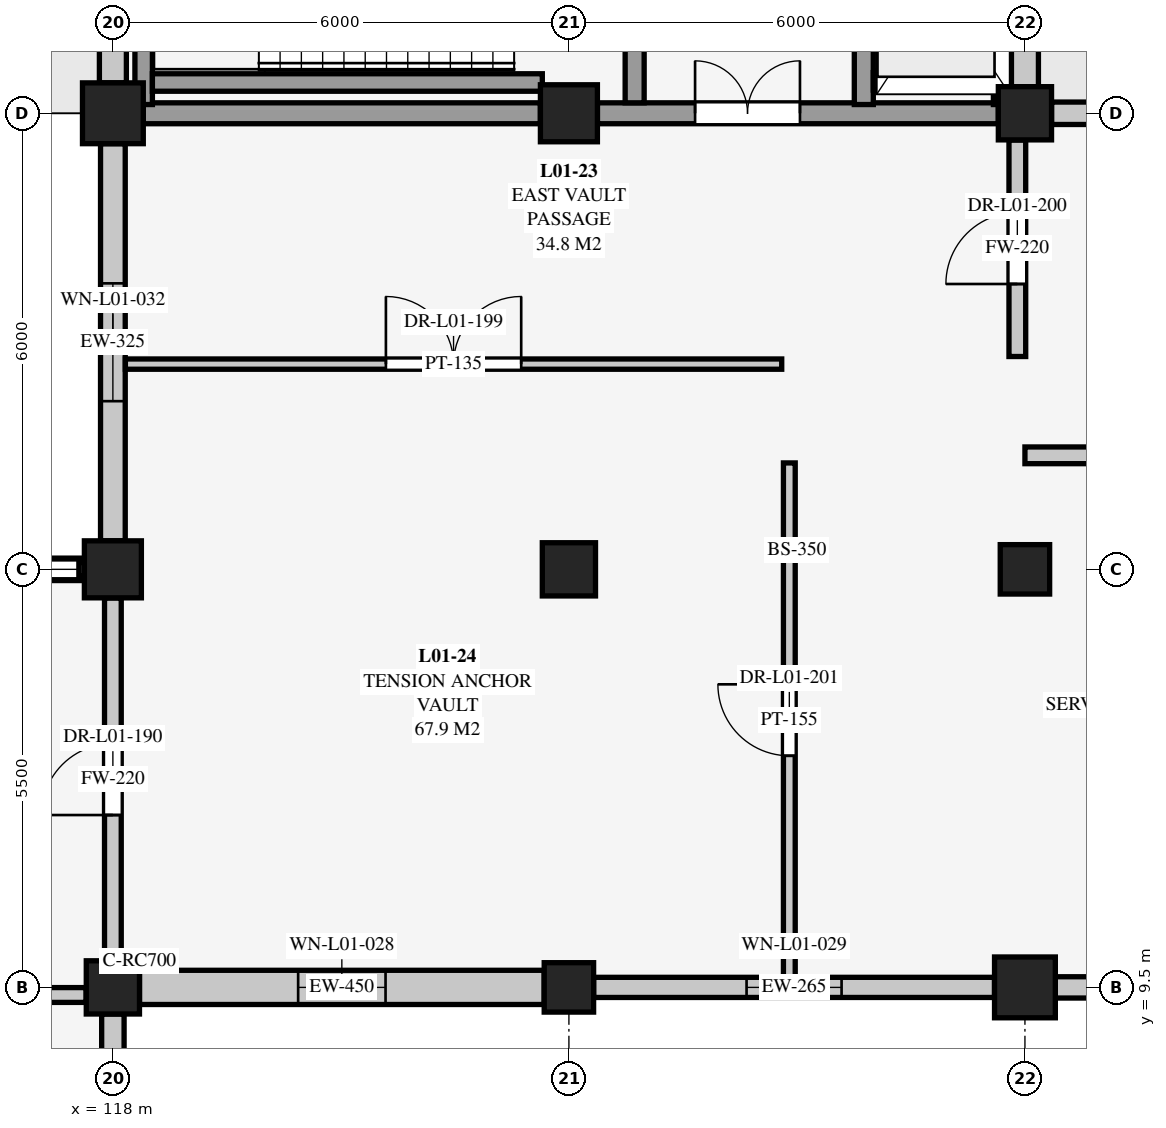
"""IFC4 building model, lengths in metres.
Left out: names, types, materials, properties, quantities, classifications, styles, units other than length and angle.
Written with IfcOpenShell. Run it as: python <this file> out.ifc"""

import sys

from ifc_helpers import new_model, si_unit, direction, frame, frame_2d, origin, origin_2d, place, context, subcontext, project, spatial, rectangle, extrude, element, fill, save


model = new_model("IFC4")
c1 = context("Model", 3, precision=1e-05, world=origin(), true_north=direction((0.0, 1.0)))
c2 = subcontext(c1, "Body", "Model", "MODEL_VIEW")
j1 = project(units=[si_unit("LENGTHUNIT", "METRE"), si_unit("PLANEANGLEUNIT", "RADIAN")], contexts=[c1])
p1 = place(None, origin())
s1 = spatial("IfcSite", under=j1, at=p1, CompositionType="ELEMENT")
p2 = place(p1, origin())
s2 = spatial("IfcBuilding", under=s1, at=p2, CompositionType="ELEMENT")
p3 = place(p2, origin())
s3 = spatial("IfcBuildingStorey", under=s2, at=p3, CompositionType="ELEMENT", Elevation=0.0)
p4 = place(p3, frame((118.0, 9.5, 0.0), z_axis=(0.0, 0.0, 1.0), x_axis=(1.0, 0.0, 0.0)))
e1 = element("IfcColumn", 1, at=p4, inside=s3, PredefinedType="COLUMN", context=c2, shape_type="SweptSolid", body=[
    extrude(rectangle(XDim=0.7, YDim=0.7, at=origin_2d()), origin(), (0.0, 0.0, 1.0), 4.5),
])
p5 = place(p3, frame((118.0, 15.0, 0.0), z_axis=(0.0, 0.0, 1.0), x_axis=(1.0, 0.0, 0.0)))
e2 = element("IfcColumn", 2, at=p5, inside=s3, PredefinedType="COLUMN", context=c2, shape_type="SweptSolid", body=[
    extrude(rectangle(XDim=0.75, YDim=0.75, at=origin_2d()), origin(), (0.0, 0.0, 1.0), 4.5),
])
p6 = place(p3, frame((118.0, 21.0, 0.0), z_axis=(0.0, 0.0, 1.0), x_axis=(1.0, 0.0, 0.0)))
e3 = element("IfcColumn", 3, at=p6, inside=s3, PredefinedType="COLUMN", context=c2, shape_type="SweptSolid", body=[
    extrude(rectangle(XDim=0.8, YDim=0.8, at=origin_2d()), origin(), (0.0, 0.0, 1.0), 4.5),
])
p7 = place(p3, frame((124.0, 9.5, 0.0), z_axis=(0.0, 0.0, 1.0), x_axis=(1.0, 0.0, 0.0)))
e4 = element("IfcColumn", 4, at=p7, inside=s3, PredefinedType="COLUMN", context=c2, shape_type="SweptSolid", body=[
    extrude(rectangle(XDim=0.65, YDim=0.65, at=origin_2d()), origin(), (0.0, 0.0, 1.0), 4.5),
])
p8 = place(p3, frame((124.0, 15.0, 0.0), z_axis=(0.0, 0.0, 1.0), x_axis=(1.0, 0.0, 0.0)))
e5 = element("IfcColumn", 5, at=p8, inside=s3, PredefinedType="COLUMN", context=c2, shape_type="SweptSolid", body=[
    extrude(rectangle(XDim=0.7, YDim=0.7, at=origin_2d()), origin(), (0.0, 0.0, 1.0), 4.5),
])
p9 = place(p3, frame((124.0, 21.0, 0.0), z_axis=(0.0, 0.0, 1.0), x_axis=(1.0, 0.0, 0.0)))
e6 = element("IfcColumn", 6, at=p9, inside=s3, PredefinedType="COLUMN", context=c2, shape_type="SweptSolid", body=[
    extrude(rectangle(XDim=0.75, YDim=0.75, at=origin_2d()), origin(), (0.0, 0.0, 1.0), 4.5),
])
p10 = place(p3, frame((130.0, 9.5, 0.0), z_axis=(0.0, 0.0, 1.0), x_axis=(1.0, 0.0, 0.0)))
e7 = element("IfcColumn", 7, at=p10, inside=s3, PredefinedType="COLUMN", context=c2, shape_type="SweptSolid", body=[
    extrude(rectangle(XDim=0.8, YDim=0.8, at=origin_2d()), origin(), (0.0, 0.0, 1.0), 4.5),
])
p11 = place(p3, frame((130.0, 15.0, 0.0), z_axis=(0.0, 0.0, 1.0), x_axis=(1.0, 0.0, 0.0)))
e8 = element("IfcColumn", 8, at=p11, inside=s3, PredefinedType="COLUMN", context=c2, shape_type="SweptSolid", body=[
    extrude(rectangle(XDim=0.65, YDim=0.65, at=origin_2d()), origin(), (0.0, 0.0, 1.0), 4.5),
])
p12 = place(p3, frame((130.0, 21.0, 0.0), z_axis=(0.0, 0.0, 1.0), x_axis=(1.0, 0.0, 0.0)))
e9 = element("IfcColumn", 9, at=p12, inside=s3, PredefinedType="COLUMN", context=c2, shape_type="SweptSolid", body=[
    extrude(rectangle(XDim=0.7, YDim=0.7, at=origin_2d()), origin(), (0.0, 0.0, 1.0), 4.5),
])
p13 = place(p3, frame((112.375, 15.0, 0.0), z_axis=(0.0, 0.0, 1.0), x_axis=(1.0, 0.0, 0.0)))
e10 = element("IfcWall", 10, at=p13, inside=s3, PredefinedType="SOLIDWALL", context=c2, shape_type="SweptSolid", body=[
    extrude(rectangle(XDim=5.25, YDim=0.295, at=frame_2d((2.625, 0.0))), origin(), (0.0, 0.0, 1.0), 0.41),
])
p14 = place(p3, frame((118.0, 9.15, 0.0), z_axis=(0.0, 0.0, 1.0), x_axis=(0.0, -1.0, 0.0)))
e11 = element("IfcWall", 11, at=p14, inside=s3, PredefinedType="SOLIDWALL", context=c2, shape_type="SweptSolid", body=[
    extrude(rectangle(XDim=4.75, YDim=0.295, at=frame_2d((2.375, 0.0))), origin(), (0.0, 0.0, 1.0), 3.821),
])
p15 = place(p14, frame((1.55, 0.0, 0.75)))
e12 = element("IfcOpeningElement", 12, at=p15, cuts=e11, PredefinedType="OPENING", context=c2, shape_type="SweptSolid", body=[
    extrude(rectangle(XDim=1.65, YDim=2.3, at=frame_2d((0.825, 1.15))), frame((0.0, 0.157, 0.0), z_axis=(0.0, -1.0, 0.0), x_axis=(1.0, 0.0, 0.0)), (0.0, 0.0, 1.0), 0.315),
])
p16 = place(p3, frame((123.675, 9.5, 0.0), z_axis=(0.0, 0.0, 1.0), x_axis=(-1.0, 0.0, 0.0)))
e13 = element("IfcWall", 13, at=p16, inside=s3, PredefinedType="SOLIDWALL", context=c2, shape_type="SweptSolid", body=[
    extrude(rectangle(XDim=5.325, YDim=0.45, at=frame_2d((2.663, 0.0))), origin(), (0.0, 0.0, 1.0), 3.821),
])
p17 = place(p16, frame((2.087, 0.0, 0.85)))
e14 = element("IfcOpeningElement", 14, at=p17, cuts=e13, PredefinedType="OPENING", context=c2, shape_type="SweptSolid", body=[
    extrude(rectangle(XDim=1.15, YDim=2.05, at=frame_2d((0.575, 1.025))), frame((0.0, 0.235, 0.0), z_axis=(0.0, -1.0, 0.0), x_axis=(1.0, 0.0, 0.0)), (0.0, 0.0, 1.0), 0.47),
])
p18 = place(p3, frame((129.6, 9.5, 0.0), z_axis=(0.0, 0.0, 1.0), x_axis=(-1.0, 0.0, 0.0)))
e15 = element("IfcWall", 15, at=p18, inside=s3, PredefinedType="SOLIDWALL", context=c2, shape_type="SweptSolid", body=[
    extrude(rectangle(XDim=5.275, YDim=0.265, at=frame_2d((2.638, 0.0))), origin(), (0.0, 0.0, 1.0), 3.821),
])
p19 = place(p18, frame((2.012, 0.0, 0.8)))
e16 = element("IfcOpeningElement", 16, at=p19, cuts=e15, PredefinedType="OPENING", context=c2, shape_type="SweptSolid", body=[
    extrude(rectangle(XDim=1.25, YDim=2.15, at=frame_2d((0.625, 1.075))), frame((0.0, 0.142, 0.0), z_axis=(0.0, -1.0, 0.0), x_axis=(1.0, 0.0, 0.0)), (0.0, 0.0, 1.0), 0.285),
])
p20 = place(p3, frame((135.625, 9.5, 0.0), z_axis=(0.0, 0.0, 1.0), x_axis=(-1.0, 0.0, 0.0)))
e17 = element("IfcWall", 17, at=p20, inside=s3, PredefinedType="SOLIDWALL", context=c2, shape_type="SweptSolid", body=[
    extrude(rectangle(XDim=5.225, YDim=0.28, at=frame_2d((2.613, 0.0))), origin(), (0.0, 0.0, 1.0), 3.821),
])
p21 = place(p20, frame((1.938, 0.0, 0.8)))
e18 = element("IfcOpeningElement", 18, at=p21, cuts=e17, PredefinedType="OPENING", context=c2, shape_type="SweptSolid", body=[
    extrude(rectangle(XDim=1.35, YDim=2.15, at=frame_2d((0.675, 1.075))), frame((0.0, 0.15, 0.0), z_axis=(0.0, -1.0, 0.0), x_axis=(1.0, 0.0, 0.0)), (0.0, 0.0, 1.0), 0.3),
])
p22 = place(p3, frame((130.35, 21.0, 0.0), z_axis=(0.0, 0.0, 1.0), x_axis=(1.0, 0.0, 0.0)))
e19 = element("IfcWall", 19, at=p22, inside=s3, PredefinedType="SOLIDWALL", context=c2, shape_type="SweptSolid", body=[
    extrude(rectangle(XDim=5.325, YDim=0.295, at=frame_2d((2.663, 0.0))), origin(), (0.0, 0.0, 1.0), 3.809),
])
p23 = place(p22, frame((1.938, 0.0, 0.75)))
e20 = element("IfcOpeningElement", 20, at=p23, cuts=e19, PredefinedType="OPENING", context=c2, shape_type="SweptSolid", body=[
    extrude(rectangle(XDim=1.45, YDim=2.25, at=frame_2d((0.725, 1.125))), frame((0.0, 0.157, 0.0), z_axis=(0.0, -1.0, 0.0), x_axis=(1.0, 0.0, 0.0)), (0.0, 0.0, 1.0), 0.315),
])
p24 = place(p3, frame((118.0, 15.375, 0.0), z_axis=(0.0, 0.0, 1.0), x_axis=(0.0, 1.0, 0.0)))
e21 = element("IfcWall", 21, at=p24, inside=s3, PredefinedType="SOLIDWALL", context=c2, shape_type="SweptSolid", body=[
    extrude(rectangle(XDim=5.225, YDim=0.325, at=frame_2d((2.613, 0.0))), origin(), (0.0, 0.0, 1.0), 3.809),
])
p25 = place(p24, frame((1.837, 0.0, 0.75)))
e22 = element("IfcOpeningElement", 22, at=p25, cuts=e21, PredefinedType="OPENING", context=c2, shape_type="SweptSolid", body=[
    extrude(rectangle(XDim=1.55, YDim=2.25, at=frame_2d((0.775, 1.125))), frame((0.0, 0.173, 0.0), z_axis=(0.0, -1.0, 0.0), x_axis=(1.0, 0.0, 0.0)), (0.0, 0.0, 1.0), 0.345),
])
p26 = place(p3, frame((118.0, 21.4, 0.0), z_axis=(0.0, 0.0, 1.0), x_axis=(0.0, 1.0, 0.0)))
e23 = element("IfcWall", 23, at=p26, inside=s3, PredefinedType="SOLIDWALL", context=c2, shape_type="SweptSolid", body=[
    extrude(rectangle(XDim=5.2, YDim=0.355, at=frame_2d((2.6, 0.0))), origin(), (0.0, 0.0, 1.0), 3.703),
])
p27 = place(p26, frame((3.91, 0.0, 0.0)))
e24 = element("IfcOpeningElement", 24, at=p27, cuts=e23, PredefinedType="OPENING", context=c2, shape_type="SweptSolid", body=[
    extrude(rectangle(XDim=1.05, YDim=2.14, at=frame_2d((0.525, 1.07))), frame((0.0, 0.188, 0.0), z_axis=(0.0, -1.0, 0.0), x_axis=(1.0, 0.0, 0.0)), (0.0, 0.0, 1.0), 0.375),
])
p28 = place(p3, frame((130.0, 26.65, 0.0), z_axis=(0.0, 0.0, 1.0), x_axis=(0.0, -1.0, 0.0)))
e25 = element("IfcWall", 25, at=p28, inside=s3, PredefinedType="SOLIDWALL", context=c2, shape_type="SweptSolid", body=[
    extrude(rectangle(XDim=5.3, YDim=0.355, at=frame_2d((2.65, 0.0))), origin(), (0.0, 0.0, 1.0), 3.703),
])
p29 = place(p3, frame((127.88, 21.42, -1.05), z_axis=(0.0, 0.0, 1.0), x_axis=(1.0, 0.0, 0.0)))
e26 = element("IfcWall", 26, at=p29, inside=s3, PredefinedType="SHEAR", context=c2, shape_type="SweptSolid", body=[
    extrude(rectangle(XDim=1.82, YDim=0.23, at=frame_2d((0.91, 0.0))), origin(), (0.0, 0.0, 1.0), 1.05),
])
for number, where, z_axis, x_axis in (
    (27, (129.7, 21.42, -1.05), (0.0, 0.0, 1.0), (0.0, 1.0, 0.0)),
    (28, (127.88, 24.08, -1.05), (0.0, 0.0, 1.0), (0.0, -1.0, 0.0)),
):
    element("IfcWall", number, at=place(p3, frame(where, z_axis=z_axis, x_axis=x_axis)), inside=s3, PredefinedType="SHEAR", context=c2, shape_type="SweptSolid", body=[
        extrude(rectangle(XDim=2.66, YDim=0.23, at=frame_2d((1.33, 0.0))), origin(), (0.0, 0.0, 1.0), 1.05),
    ])
p30 = place(p3, frame((118.4, 21.0, 0.0), z_axis=(0.0, 0.0, 1.0), x_axis=(1.0, 0.0, 0.0)))
e29 = element("IfcWall", 29, at=p30, inside=s3, PredefinedType="SHEAR", context=c2, shape_type="SweptSolid", body=[
    extrude(rectangle(XDim=5.225, YDim=0.275, at=frame_2d((2.613, 0.0))), origin(), (0.0, 0.0, 1.0), 4.216),
])
p31 = place(p3, frame((124.375, 21.0, 0.0), z_axis=(0.0, 0.0, 1.0), x_axis=(1.0, 0.0, 0.0)))
e30 = element("IfcWall", 30, at=p31, inside=s3, PredefinedType="SHEAR", context=c2, shape_type="SweptSolid", body=[
    extrude(rectangle(XDim=5.275, YDim=0.275, at=frame_2d((2.637, 0.0))), origin(), (0.0, 0.0, 1.0), 4.216),
])
p32 = place(p31, frame((1.285, 0.0, 0.0)))
e31 = element("IfcOpeningElement", 31, at=p32, cuts=e30, PredefinedType="OPENING", context=c2, shape_type="SweptSolid", body=[
    extrude(rectangle(XDim=1.38, YDim=2.16, at=frame_2d((0.69, 1.08))), frame((0.0, 0.147, 0.0), z_axis=(0.0, -1.0, 0.0), x_axis=(1.0, 0.0, 0.0)), (0.0, 0.0, 1.0), 0.295),
])
p33 = place(p3, frame((118.405, 21.115, 0.0), z_axis=(0.0, 0.0, 1.0), x_axis=(0.0, 1.0, 0.0)))
e32 = element("IfcWall", 32, at=p33, inside=s3, PredefinedType="SHEAR", context=c2, shape_type="SweptSolid", body=[
    extrude(rectangle(XDim=3.735, YDim=0.23, at=frame_2d((1.868, 0.0))), origin(), (0.0, 0.0, 1.0), 4.5),
])
p34 = place(p3, frame((118.52, 21.405, 0.0), z_axis=(0.0, 0.0, 1.0), x_axis=(1.0, 0.0, 0.0)))
e33 = element("IfcWall", 33, at=p34, inside=s3, PredefinedType="SHEAR", context=c2, shape_type="SweptSolid", body=[
    extrude(rectangle(XDim=5.13, YDim=0.23, at=frame_2d((2.565, 0.0))), origin(), (0.0, 0.0, 1.0), 4.5),
])
p35 = place(p3, frame((124.865, 21.137, 0.0), z_axis=(0.0, 0.0, 1.0), x_axis=(0.0, 1.0, 0.0)))
e34 = element("IfcWall", 34, at=p35, inside=s3, PredefinedType="SHEAR", context=c2, shape_type="SweptSolid", body=[
    extrude(rectangle(XDim=5.688, YDim=0.25, at=frame_2d((2.844, 0.0))), origin(), (0.0, 0.0, 1.0), 4.216),
])
p36 = place(p35, frame((4.262, 0.0, 0.0)))
e35 = element("IfcOpeningElement", 35, at=p36, cuts=e34, PredefinedType="OPENING", context=c2, shape_type="SweptSolid", body=[
    extrude(rectangle(XDim=1.04, YDim=2.14, at=frame_2d((0.52, 1.07))), frame((0.0, 0.135, 0.0), z_axis=(0.0, -1.0, 0.0), x_axis=(1.0, 0.0, 0.0)), (0.0, 0.0, 1.0), 0.27),
])
p37 = place(p3, frame((127.88, 21.115, 0.0), z_axis=(0.0, 0.0, 1.0), x_axis=(0.0, 1.0, 0.0)))
e36 = element("IfcWall", 36, at=p37, inside=s3, PredefinedType="SHEAR", context=c2, shape_type="SweptSolid", body=[
    extrude(rectangle(XDim=2.965, YDim=0.25, at=frame_2d((1.482, 0.0))), origin(), (0.0, 0.0, 1.0), 4.5),
])
p38 = place(p37, frame((1.095, 0.0, 0.0)))
e37 = element("IfcOpeningElement", 37, at=p38, cuts=e36, PredefinedType="OPENING", context=c2, shape_type="SweptSolid", body=[
    extrude(rectangle(XDim=1.08, YDim=2.15, at=frame_2d((0.54, 1.075))), frame((0.0, 0.135, 0.0), z_axis=(0.0, -1.0, 0.0), x_axis=(1.0, 0.0, 0.0)), (0.0, 0.0, 1.0), 0.27),
])
p39 = place(p3, frame((128.005, 21.42, 0.0), z_axis=(0.0, 0.0, 1.0), x_axis=(1.0, 0.0, 0.0)))
e38 = element("IfcWall", 38, at=p39, inside=s3, PredefinedType="SHEAR", context=c2, shape_type="SweptSolid", body=[
    extrude(rectangle(XDim=1.58, YDim=0.23, at=frame_2d((0.79, 0.0))), origin(), (0.0, 0.0, 1.0), 4.5),
])
p40 = place(p3, frame((129.7, 21.115, 0.0), z_axis=(0.0, 0.0, 1.0), x_axis=(0.0, 1.0, 0.0)))
e39 = element("IfcWall", 39, at=p40, inside=s3, PredefinedType="SHEAR", context=c2, shape_type="SweptSolid", body=[
    extrude(rectangle(XDim=2.965, YDim=0.23, at=frame_2d((1.482, 0.0))), origin(), (0.0, 0.0, 1.0), 4.5),
])
p41 = place(p3, frame((112.327, 9.4, 0.0), z_axis=(0.0, 0.0, 1.0), x_axis=(1.0, 0.0, 0.0)))
e40 = element("IfcWall", 40, at=p41, inside=s3, PredefinedType="PARTITIONING", context=c2, shape_type="SweptSolid", body=[
    extrude(rectangle(XDim=5.321, YDim=0.195, at=frame_2d((2.661, 0.0))), origin(), (0.0, 0.0, 1.0), 3.922),
])
p42 = place(p41, frame((2.19, 0.0, 0.0)))
e41 = element("IfcOpeningElement", 41, at=p42, cuts=e40, PredefinedType="OPENING", context=c2, shape_type="SweptSolid", body=[
    extrude(rectangle(XDim=0.94, YDim=2.1, at=frame_2d((0.47, 1.05))), frame((0.0, 0.108, 0.0), z_axis=(0.0, -1.0, 0.0), x_axis=(1.0, 0.0, 0.0)), (0.0, 0.0, 1.0), 0.215),
])
p43 = place(p3, frame((118.0, 9.852, 0.0), z_axis=(0.0, 0.0, 1.0), x_axis=(0.0, 1.0, 0.0)))
e42 = element("IfcWall", 42, at=p43, inside=s3, PredefinedType="SOLIDWALL", context=c2, shape_type="SweptSolid", body=[
    extrude(rectangle(XDim=4.771, YDim=0.22, at=frame_2d((2.385, 0.0))), origin(), (0.0, 0.0, 1.0), 3.874),
])
p44 = place(p43, frame((1.916, 0.0, 0.0)))
e43 = element("IfcOpeningElement", 43, at=p44, cuts=e42, PredefinedType="OPENING", context=c2, shape_type="SweptSolid", body=[
    extrude(rectangle(XDim=0.94, YDim=2.1, at=frame_2d((0.47, 1.05))), frame((0.0, 0.12, 0.0), z_axis=(0.0, -1.0, 0.0), x_axis=(1.0, 0.0, 0.0)), (0.0, 0.0, 1.0), 0.24),
])
p45 = place(p3, frame((118.165, 17.7, 0.0), z_axis=(0.0, 0.0, 1.0), x_axis=(1.0, 0.0, 0.0)))
e44 = element("IfcWall", 44, at=p45, inside=s3, PredefinedType="PARTITIONING", context=c2, shape_type="SweptSolid", body=[
    extrude(rectangle(XDim=8.635, YDim=0.135, at=frame_2d((4.318, 0.0))), origin(), (0.0, 0.0, 1.0), 4.228),
])
p46 = place(p45, frame((3.428, 0.0, 0.0)))
e45 = element("IfcOpeningElement", 45, at=p46, cuts=e44, PredefinedType="OPENING", context=c2, shape_type="SweptSolid", body=[
    extrude(rectangle(XDim=1.78, YDim=2.3, at=frame_2d((0.89, 1.15))), frame((0.0, 0.077, 0.0), z_axis=(0.0, -1.0, 0.0), x_axis=(1.0, 0.0, 0.0)), (0.0, 0.0, 1.0), 0.155),
])
p47 = place(p3, frame((129.9, 17.8, 0.0), z_axis=(0.0, 0.0, 1.0), x_axis=(0.0, 1.0, 0.0)))
e46 = element("IfcWall", 46, at=p47, inside=s3, PredefinedType="SOLIDWALL", context=c2, shape_type="SweptSolid", body=[
    extrude(rectangle(XDim=2.848, YDim=0.22, at=frame_2d((1.424, 0.0))), origin(), (0.0, 0.0, 1.0), 3.608),
])
p48 = place(p47, frame((0.954, 0.0, 0.0)))
e47 = element("IfcOpeningElement", 47, at=p48, cuts=e46, PredefinedType="OPENING", context=c2, shape_type="SweptSolid", body=[
    extrude(rectangle(XDim=0.94, YDim=2.1, at=frame_2d((0.47, 1.05))), frame((0.0, 0.12, 0.0), z_axis=(0.0, -1.0, 0.0), x_axis=(1.0, 0.0, 0.0)), (0.0, 0.0, 1.0), 0.24),
])
p49 = place(p3, frame((126.9, 9.635, 0.0), z_axis=(0.0, 0.0, 1.0), x_axis=(0.0, 1.0, 0.0)))
e48 = element("IfcWall", 48, at=p49, inside=s3, PredefinedType="PARTITIONING", context=c2, shape_type="SweptSolid", body=[
    extrude(rectangle(XDim=6.765, YDim=0.155, at=frame_2d((3.383, 0.0))), origin(), (0.0, 0.0, 1.0), 4.228),
])
p50 = place(p49, frame((2.913, 0.0, 0.0)))
e49 = element("IfcOpeningElement", 49, at=p50, cuts=e48, PredefinedType="OPENING", context=c2, shape_type="SweptSolid", body=[
    extrude(rectangle(XDim=0.94, YDim=2.1, at=frame_2d((0.47, 1.05))), frame((0.0, 0.088, 0.0), z_axis=(0.0, -1.0, 0.0), x_axis=(1.0, 0.0, 0.0)), (0.0, 0.0, 1.0), 0.175),
])
p51 = place(p3, frame((130.0, 16.5, 0.0), z_axis=(0.0, 0.0, 1.0), x_axis=(1.0, 0.0, 0.0)))
e50 = element("IfcWall", 50, at=p51, inside=s3, PredefinedType="SOLIDWALL", context=c2, shape_type="SweptSolid", body=[
    extrude(rectangle(XDim=5.828, YDim=0.22, at=frame_2d((2.914, 0.0))), origin(), (0.0, 0.0, 1.0), 4.228),
])
p52 = place(p17, origin())
e51 = element("IfcWindow", 51, at=p52, inside=s3, PartitioningType="SINGLE_PANEL", PredefinedType="WINDOW", context=c2, shape_type="SweptSolid", body=[
    extrude(rectangle(XDim=1.15, YDim=2.05, at=frame_2d((0.575, 1.025))), frame((0.0, 0.03, 0.0), z_axis=(0.0, -1.0, 0.0), x_axis=(1.0, 0.0, 0.0)), (0.0, 0.0, 1.0), 0.06),
])
fill(e14, e51)
p53 = place(p19, origin())
e52 = element("IfcWindow", 52, at=p53, inside=s3, PartitioningType="SINGLE_PANEL", PredefinedType="WINDOW", context=c2, shape_type="SweptSolid", body=[
    extrude(rectangle(XDim=1.25, YDim=2.15, at=frame_2d((0.625, 1.075))), frame((0.0, 0.03, 0.0), z_axis=(0.0, -1.0, 0.0), x_axis=(1.0, 0.0, 0.0)), (0.0, 0.0, 1.0), 0.06),
])
fill(e16, e52)
p54 = place(p25, origin())
e53 = element("IfcWindow", 53, at=p54, inside=s3, PartitioningType="SINGLE_PANEL", PredefinedType="WINDOW", context=c2, shape_type="SweptSolid", body=[
    extrude(rectangle(XDim=1.55, YDim=2.25, at=frame_2d((0.775, 1.125))), frame((0.0, 0.03, 0.0), z_axis=(0.0, -1.0, 0.0), x_axis=(1.0, 0.0, 0.0)), (0.0, 0.0, 1.0), 0.06),
])
fill(e22, e53)
p55 = place(p32, origin())
e54 = element("IfcDoor", 54, at=p55, inside=s3, OperationType="DOUBLE_DOOR_SINGLE_SWING", PredefinedType="DOOR", context=c2, shape_type="SweptSolid", body=[
    extrude(rectangle(XDim=1.38, YDim=2.16, at=frame_2d((0.69, 1.08))), frame((0.0, 0.025, 0.0), z_axis=(0.0, -1.0, 0.0), x_axis=(1.0, 0.0, 0.0)), (0.0, 0.0, 1.0), 0.05),
])
fill(e31, e54)
p56 = place(p44, origin())
e55 = element("IfcDoor", 55, at=p56, inside=s3, OperationType="SINGLE_SWING_LEFT", PredefinedType="DOOR", context=c2, shape_type="SweptSolid", body=[
    extrude(rectangle(XDim=0.94, YDim=2.1, at=frame_2d((0.47, 1.05))), frame((0.0, 0.025, 0.0), z_axis=(0.0, -1.0, 0.0), x_axis=(1.0, 0.0, 0.0)), (0.0, 0.0, 1.0), 0.05),
])
fill(e43, e55)
p57 = place(p46, origin())
e56 = element("IfcDoor", 56, at=p57, inside=s3, OperationType="DOUBLE_DOOR_SINGLE_SWING", PredefinedType="DOOR", context=c2, shape_type="SweptSolid", body=[
    extrude(rectangle(XDim=1.78, YDim=2.3, at=frame_2d((0.89, 1.15))), frame((0.0, 0.025, 0.0), z_axis=(0.0, -1.0, 0.0), x_axis=(1.0, 0.0, 0.0)), (0.0, 0.0, 1.0), 0.05),
])
fill(e45, e56)
p58 = place(p48, origin())
e57 = element("IfcDoor", 57, at=p58, inside=s3, OperationType="SINGLE_SWING_LEFT", PredefinedType="DOOR", context=c2, shape_type="SweptSolid", body=[
    extrude(rectangle(XDim=0.94, YDim=2.1, at=frame_2d((0.47, 1.05))), frame((0.0, 0.025, 0.0), z_axis=(0.0, -1.0, 0.0), x_axis=(1.0, 0.0, 0.0)), (0.0, 0.0, 1.0), 0.05),
])
fill(e47, e57)
p59 = place(p50, origin())
e58 = element("IfcDoor", 58, at=p59, inside=s3, OperationType="SINGLE_SWING_RIGHT", PredefinedType="DOOR", context=c2, shape_type="SweptSolid", body=[
    extrude(rectangle(XDim=0.94, YDim=2.1, at=frame_2d((0.47, 1.05))), frame((0.0, 0.025, 0.0), z_axis=(0.0, -1.0, 0.0), x_axis=(1.0, 0.0, 0.0)), (0.0, 0.0, 1.0), 0.05),
])
fill(e49, e58)
save(model, sys.argv[1])
